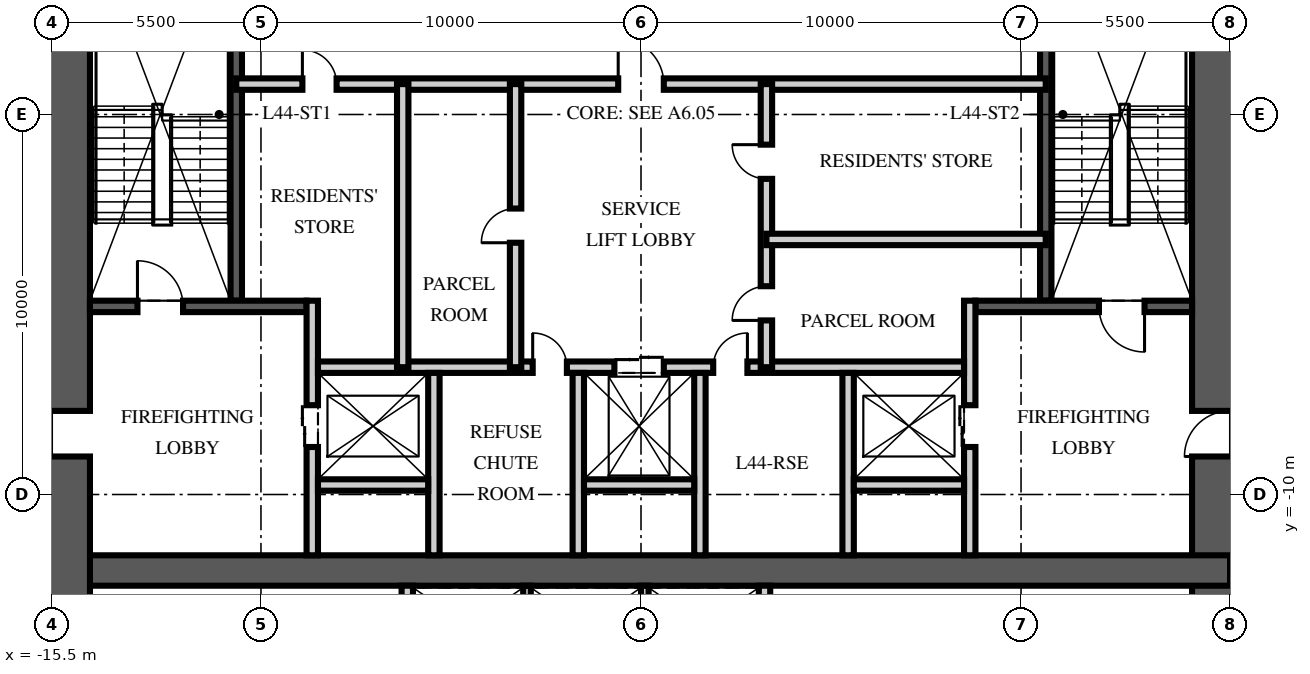
"""IFC4 building model, lengths in metres.
Left out: names, types, materials, properties, quantities, classifications, styles, units other than length and angle.
Written with IfcOpenShell. Run it as: python <this file> out.ifc"""

import sys

from ifc_helpers import new_model, si_unit, direction, frame, frame_2d, origin, place, context, subcontext, project, spatial, rectangle, extrude, element, fill, save


model = new_model("IFC4")
c1 = context("Model", 3, precision=1e-05, world=origin(), true_north=direction((0.0, 1.0)))
c2 = subcontext(c1, "Body", "Model", "MODEL_VIEW")
j1 = project(units=[si_unit("LENGTHUNIT", "METRE"), si_unit("PLANEANGLEUNIT", "RADIAN")], contexts=[c1])
p1 = place(None, origin())
s1 = spatial("IfcSite", under=j1, at=p1, CompositionType="ELEMENT")
p2 = place(p1, origin())
s2 = spatial("IfcBuilding", under=s1, at=p2, CompositionType="ELEMENT")
p3 = place(p2, frame((0.0, 0.0, 174.75)))
s3 = spatial("IfcBuildingStorey", under=s2, at=p3, CompositionType="ELEMENT", Elevation=174.75)
p4 = place(p3, frame((15.5, -15.5, -0.25), z_axis=(0.0, 0.0, 1.0), x_axis=(0.0, 1.0, 0.0)))
e1 = element("IfcWall", 1, at=p4, inside=s3, PredefinedType="SHEAR", context=c2, shape_type="SweptSolid", body=[
    extrude(rectangle(XDim=31.0, YDim=2.0, at=frame_2d((15.5, 0.0))), origin(), (0.0, 0.0, 1.0), 3.75),
])
p5 = place(p4, frame((6.5, 0.0, 0.25)))
e2 = element("IfcOpeningElement", 2, at=p5, cuts=e1, PredefinedType="OPENING", context=c2, shape_type="SweptSolid", body=[
    extrude(rectangle(XDim=1.2, YDim=2.1, at=frame_2d((0.6, 1.05))), frame((0.0, 1.01, 0.0), z_axis=(0.0, -1.0, 0.0), x_axis=(1.0, 0.0, 0.0)), (0.0, 0.0, 1.0), 2.02),
])
p6 = place(p4, frame((23.0, 0.0, 0.25)))
e3 = element("IfcOpeningElement", 3, at=p6, cuts=e1, PredefinedType="OPENING", context=c2, shape_type="SweptSolid", body=[
    extrude(rectangle(XDim=1.8, YDim=2.1, at=frame_2d((0.9, 1.05))), frame((0.0, 1.01, 0.0), z_axis=(0.0, -1.0, 0.0), x_axis=(1.0, 0.0, 0.0)), (0.0, 0.0, 1.0), 2.02),
])
p7 = place(p3, frame((-15.5, -12.0, -0.25), z_axis=(0.0, 0.0, 1.0), x_axis=(1.0, 0.0, 0.0)))
e4 = element("IfcWall", 4, at=p7, inside=s3, PredefinedType="SHEAR", context=c2, shape_type="SweptSolid", body=[
    extrude(rectangle(XDim=31.0, YDim=0.8, at=frame_2d((15.5, 0.0))), origin(), (0.0, 0.0, 1.0), 3.75),
])
p8 = place(p3, frame((-15.5, -15.5, -0.25), z_axis=(0.0, 0.0, 1.0), x_axis=(0.0, 1.0, 0.0)))
e5 = element("IfcWall", 5, at=p8, inside=s3, PredefinedType="SHEAR", context=c2, shape_type="SweptSolid", body=[
    extrude(rectangle(XDim=31.0, YDim=2.0, at=frame_2d((15.5, 0.0))), origin(), (0.0, 0.0, 1.0), 3.75),
])
p9 = place(p8, frame((6.5, 0.0, 0.25)))
e6 = element("IfcOpeningElement", 6, at=p9, cuts=e5, PredefinedType="OPENING", context=c2, shape_type="SweptSolid", body=[
    extrude(rectangle(XDim=1.2, YDim=2.1, at=frame_2d((0.6, 1.05))), frame((0.0, 1.01, 0.0), z_axis=(0.0, -1.0, 0.0), x_axis=(1.0, 0.0, 0.0)), (0.0, 0.0, 1.0), 2.02),
])
p10 = place(p8, frame((23.0, 0.0, 0.25)))
e7 = element("IfcOpeningElement", 7, at=p10, cuts=e5, PredefinedType="OPENING", context=c2, shape_type="SweptSolid", body=[
    extrude(rectangle(XDim=1.8, YDim=2.1, at=frame_2d((0.9, 1.05))), frame((0.0, 1.01, 0.0), z_axis=(0.0, -1.0, 0.0), x_axis=(1.0, 0.0, 0.0)), (0.0, 0.0, 1.0), 2.02),
])
p11 = place(p3, frame((-10.65, -4.9, 0.0), z_axis=(0.0, 0.0, 1.0), x_axis=(0.0, 1.0, 0.0)))
e8 = element("IfcWall", 8, at=p11, inside=s3, PredefinedType="SOLIDWALL", context=c2, shape_type="SweptSolid", body=[
    extrude(rectangle(XDim=10.1, YDim=0.3, at=frame_2d((5.05, 0.0))), origin(), (0.0, 0.0, 1.0), 3.5),
])
p12 = place(p3, frame((-14.5, -5.05, 0.0), z_axis=(0.0, 0.0, 1.0), x_axis=(1.0, 0.0, 0.0)))
e9 = element("IfcWall", 9, at=p12, inside=s3, PredefinedType="SOLIDWALL", context=c2, shape_type="SweptSolid", body=[
    extrude(rectangle(XDim=5.7, YDim=0.3, at=frame_2d((2.85, 0.0))), origin(), (0.0, 0.0, 1.0), 3.5),
])
p13 = place(p12, frame((1.25, 0.0, 0.0)))
e10 = element("IfcOpeningElement", 10, at=p13, cuts=e9, PredefinedType="OPENING", context=c2, shape_type="SweptSolid", body=[
    extrude(rectangle(XDim=1.2, YDim=2.1, at=frame_2d((0.6, 1.05))), frame((0.0, 0.16, 0.0), z_axis=(0.0, -1.0, 0.0), x_axis=(1.0, 0.0, 0.0)), (0.0, 0.0, 1.0), 0.32),
])
p14 = place(p3, frame((-8.65, -11.6, 0.0), z_axis=(0.0, 0.0, 1.0), x_axis=(0.0, 1.0, 0.0)))
e11 = element("IfcWall", 11, at=p14, inside=s3, PredefinedType="PARTITIONING", context=c2, shape_type="SweptSolid", body=[
    extrude(rectangle(XDim=6.7, YDim=0.3, at=frame_2d((3.35, 0.0))), origin(), (0.0, 0.0, 1.0), 3.5),
])
p15 = place(p14, frame((2.85, 0.0, 0.0)))
e12 = element("IfcOpeningElement", 12, at=p15, cuts=e11, PredefinedType="OPENING", context=c2, shape_type="SweptSolid", body=[
    extrude(rectangle(XDim=1.1, YDim=2.1, at=frame_2d((0.55, 1.05))), frame((0.0, 0.16, 0.0), z_axis=(0.0, -1.0, 0.0), x_axis=(1.0, 0.0, 0.0)), (0.0, 0.0, 1.0), 0.32),
])
p16 = place(p3, frame((10.65, -4.9, 0.0), z_axis=(0.0, 0.0, 1.0), x_axis=(0.0, 1.0, 0.0)))
e13 = element("IfcWall", 13, at=p16, inside=s3, PredefinedType="SOLIDWALL", context=c2, shape_type="SweptSolid", body=[
    extrude(rectangle(XDim=10.1, YDim=0.3, at=frame_2d((5.05, 0.0))), origin(), (0.0, 0.0, 1.0), 3.5),
])
p17 = place(p3, frame((14.5, -5.05, 0.0), z_axis=(0.0, 0.0, 1.0), x_axis=(-1.0, 0.0, 0.0)))
e14 = element("IfcWall", 14, at=p17, inside=s3, PredefinedType="SOLIDWALL", context=c2, shape_type="SweptSolid", body=[
    extrude(rectangle(XDim=5.7, YDim=0.3, at=frame_2d((2.85, 0.0))), origin(), (0.0, 0.0, 1.0), 3.5),
])
p18 = place(p17, frame((1.25, 0.0, 0.0)))
e15 = element("IfcOpeningElement", 15, at=p18, cuts=e14, PredefinedType="OPENING", context=c2, shape_type="SweptSolid", body=[
    extrude(rectangle(XDim=1.2, YDim=2.1, at=frame_2d((0.6, 1.05))), frame((0.0, 0.16, 0.0), z_axis=(0.0, -1.0, 0.0), x_axis=(1.0, 0.0, 0.0)), (0.0, 0.0, 1.0), 0.32),
])
p19 = place(p3, frame((8.65, -11.6, 0.0), z_axis=(0.0, 0.0, 1.0), x_axis=(0.0, 1.0, 0.0)))
e16 = element("IfcWall", 16, at=p19, inside=s3, PredefinedType="PARTITIONING", context=c2, shape_type="SweptSolid", body=[
    extrude(rectangle(XDim=6.7, YDim=0.3, at=frame_2d((3.35, 0.0))), origin(), (0.0, 0.0, 1.0), 3.5),
])
p20 = place(p19, frame((2.85, 0.0, 0.0)))
e17 = element("IfcOpeningElement", 17, at=p20, cuts=e16, PredefinedType="OPENING", context=c2, shape_type="SweptSolid", body=[
    extrude(rectangle(XDim=1.1, YDim=2.1, at=frame_2d((0.55, 1.05))), frame((0.0, 0.16, 0.0), z_axis=(0.0, -1.0, 0.0), x_axis=(1.0, 0.0, 0.0)), (0.0, 0.0, 1.0), 0.32),
])
p21 = place(p3, frame((-8.5, -6.65, 0.0), z_axis=(0.0, 0.0, 1.0), x_axis=(1.0, 0.0, 0.0)))
e18 = element("IfcWall", 18, at=p21, inside=s3, PredefinedType="PARTITIONING", context=c2, shape_type="SweptSolid", body=[
    extrude(rectangle(XDim=17.0, YDim=0.3, at=frame_2d((8.5, 0.0))), origin(), (0.0, 0.0, 1.0), 3.5),
])
p22 = place(p21, frame((7.8, 0.0, 0.0)))
e19 = element("IfcOpeningElement", 19, at=p22, cuts=e18, PredefinedType="OPENING", context=c2, shape_type="SweptSolid", body=[
    extrude(rectangle(XDim=1.3, YDim=2.4, at=frame_2d((0.65, 1.2))), frame((0.0, 0.16, 0.0), z_axis=(0.0, -1.0, 0.0), x_axis=(1.0, 0.0, 0.0)), (0.0, 0.0, 1.0), 0.32),
])
p23 = place(p21, frame((5.65, 0.0, 0.0)))
e20 = element("IfcOpeningElement", 20, at=p23, cuts=e18, PredefinedType="OPENING", context=c2, shape_type="SweptSolid", body=[
    extrude(rectangle(XDim=0.9, YDim=2.1, at=frame_2d((0.45, 1.05))), frame((0.0, 0.16, 0.0), z_axis=(0.0, -1.0, 0.0), x_axis=(1.0, 0.0, 0.0)), (0.0, 0.0, 1.0), 0.32),
])
p24 = place(p21, frame((10.4, 0.0, 0.0)))
e21 = element("IfcOpeningElement", 21, at=p24, cuts=e18, PredefinedType="OPENING", context=c2, shape_type="SweptSolid", body=[
    extrude(rectangle(XDim=0.9, YDim=2.1, at=frame_2d((0.45, 1.05))), frame((0.0, 0.16, 0.0), z_axis=(0.0, -1.0, 0.0), x_axis=(1.0, 0.0, 0.0)), (0.0, 0.0, 1.0), 0.32),
])
for number, where, z_axis, x_axis in (
    (22, (-5.45, -11.6, 0.0), (0.0, 0.0, 1.0), (0.0, 1.0, 0.0)),
    (23, (-1.65, -11.6, 0.0), (0.0, 0.0, 1.0), (0.0, 1.0, 0.0)),
    (24, (1.55, -11.6, 0.0), (0.0, 0.0, 1.0), (0.0, 1.0, 0.0)),
    (25, (5.45, -11.6, 0.0), (0.0, 0.0, 1.0), (0.0, 1.0, 0.0)),
):
    element("IfcWall", number, at=place(p3, frame(where, z_axis=z_axis, x_axis=x_axis)), inside=s3, PredefinedType="PARTITIONING", context=c2, shape_type="SweptSolid", body=[
        extrude(rectangle(XDim=4.8, YDim=0.3, at=frame_2d((2.4, 0.0))), origin(), (0.0, 0.0, 1.0), 3.5),
    ])
for number, where, z_axis, x_axis in (
    (26, (-8.5, -9.75, 0.0), (0.0, 0.0, 1.0), (1.0, 0.0, 0.0)),
    (27, (-1.5, -9.75, 0.0), (0.0, 0.0, 1.0), (1.0, 0.0, 0.0)),
    (28, (5.6, -9.75, 0.0), (0.0, 0.0, 1.0), (1.0, 0.0, 0.0)),
):
    element("IfcWall", number, at=place(p3, frame(where, z_axis=z_axis, x_axis=x_axis)), inside=s3, PredefinedType="PARTITIONING", context=c2, shape_type="SweptSolid", body=[
        extrude(rectangle(XDim=2.9, YDim=0.3, at=frame_2d((1.45, 0.0))), origin(), (0.0, 0.0, 1.0), 3.5),
    ])
for number, where, z_axis, x_axis in (
    (29, (-6.15, -14.5, 0.0), (0.0, 0.0, 1.0), (0.0, 1.0, 0.0)),
    (30, (3.25, -14.5, 0.0), (0.0, 0.0, 1.0), (0.0, 1.0, 0.0)),
):
    element("IfcWall", number, at=place(p3, frame(where, z_axis=z_axis, x_axis=x_axis)), inside=s3, PredefinedType="PARTITIONING", context=c2, shape_type="SweptSolid", body=[
        extrude(rectangle(XDim=2.1, YDim=0.3, at=frame_2d((1.05, 0.0))), origin(), (0.0, 0.0, 1.0), 3.5),
    ])
for number, where, z_axis, x_axis in (
    (31, (-3.0, -14.5, 0.0), (0.0, 0.0, 1.0), (0.0, 1.0, 0.0)),
    (32, (0.1, -14.5, 0.0), (0.0, 0.0, 1.0), (0.0, 1.0, 0.0)),
):
    element("IfcWall", number, at=place(p3, frame(where, z_axis=z_axis, x_axis=x_axis)), inside=s3, PredefinedType="PARTITIONING", context=c2, shape_type="SweptSolid", body=[
        extrude(rectangle(XDim=2.1, YDim=0.2, at=frame_2d((1.05, 0.0))), origin(), (0.0, 0.0, 1.0), 3.5),
    ])
p25 = place(p3, frame((-10.65, 0.8, 0.0), z_axis=(0.0, 0.0, 1.0), x_axis=(1.0, 0.0, 0.0)))
e33 = element("IfcWall", 33, at=p25, inside=s3, PredefinedType="PARTITIONING", context=c2, shape_type="SweptSolid", body=[
    extrude(rectangle(XDim=21.3, YDim=0.3, at=frame_2d((10.65, 0.0))), origin(), (0.0, 0.0, 1.0), 3.5),
])
p26 = place(p25, frame((10.05, 0.0, 0.0)))
e34 = element("IfcOpeningElement", 34, at=p26, cuts=e33, PredefinedType="OPENING", context=c2, shape_type="SweptSolid", body=[
    extrude(rectangle(XDim=1.2, YDim=2.1, at=frame_2d((0.6, 1.05))), frame((0.0, 0.16, 0.0), z_axis=(0.0, -1.0, 0.0), x_axis=(1.0, 0.0, 0.0)), (0.0, 0.0, 1.0), 0.32),
])
p27 = place(p25, frame((1.74, 0.0, 0.0)))
e35 = element("IfcOpeningElement", 35, at=p27, cuts=e33, PredefinedType="OPENING", context=c2, shape_type="SweptSolid", body=[
    extrude(rectangle(XDim=0.9, YDim=2.1, at=frame_2d((0.45, 1.05))), frame((0.0, 0.16, 0.0), z_axis=(0.0, -1.0, 0.0), x_axis=(1.0, 0.0, 0.0)), (0.0, 0.0, 1.0), 0.32),
])
p28 = place(p3, frame((-3.3, -6.65, 0.0), z_axis=(0.0, 0.0, 1.0), x_axis=(0.0, 1.0, 0.0)))
e36 = element("IfcWall", 36, at=p28, inside=s3, PredefinedType="PARTITIONING", context=c2, shape_type="SweptSolid", body=[
    extrude(rectangle(XDim=7.45, YDim=0.3, at=frame_2d((3.725, 0.0))), origin(), (0.0, 0.0, 1.0), 3.5),
])
p29 = place(p28, frame((3.275, 0.0, 0.0)))
e37 = element("IfcOpeningElement", 37, at=p29, cuts=e36, PredefinedType="OPENING", context=c2, shape_type="SweptSolid", body=[
    extrude(rectangle(XDim=0.9, YDim=2.1, at=frame_2d((0.45, 1.05))), frame((0.0, 0.16, 0.0), z_axis=(0.0, -1.0, 0.0), x_axis=(1.0, 0.0, 0.0)), (0.0, 0.0, 1.0), 0.32),
])
p30 = place(p3, frame((3.3, -6.65, 0.0), z_axis=(0.0, 0.0, 1.0), x_axis=(0.0, 1.0, 0.0)))
e38 = element("IfcWall", 38, at=p30, inside=s3, PredefinedType="PARTITIONING", context=c2, shape_type="SweptSolid", body=[
    extrude(rectangle(XDim=7.45, YDim=0.3, at=frame_2d((3.725, 0.0))), origin(), (0.0, 0.0, 1.0), 3.5),
])
p31 = place(p30, frame((1.231, 0.0, 0.0)))
e39 = element("IfcOpeningElement", 39, at=p31, cuts=e38, PredefinedType="OPENING", context=c2, shape_type="SweptSolid", body=[
    extrude(rectangle(XDim=0.9, YDim=2.1, at=frame_2d((0.45, 1.05))), frame((0.0, 0.16, 0.0), z_axis=(0.0, -1.0, 0.0), x_axis=(1.0, 0.0, 0.0)), (0.0, 0.0, 1.0), 0.32),
])
p32 = place(p30, frame((4.956, 0.0, 0.0)))
e40 = element("IfcOpeningElement", 40, at=p32, cuts=e38, PredefinedType="OPENING", context=c2, shape_type="SweptSolid", body=[
    extrude(rectangle(XDim=0.9, YDim=2.1, at=frame_2d((0.45, 1.05))), frame((0.0, 0.16, 0.0), z_axis=(0.0, -1.0, 0.0), x_axis=(1.0, 0.0, 0.0)), (0.0, 0.0, 1.0), 0.32),
])
p33 = place(p3, frame((-6.27, -6.65, 0.0), z_axis=(0.0, 0.0, 1.0), x_axis=(0.0, 1.0, 0.0)))
e41 = element("IfcWall", 41, at=p33, inside=s3, PredefinedType="PARTITIONING", context=c2, shape_type="SweptSolid", body=[
    extrude(rectangle(XDim=7.45, YDim=0.3, at=frame_2d((3.725, 0.0))), origin(), (0.0, 0.0, 1.0), 3.5),
])
p34 = place(p3, frame((10.65, -3.288, 0.0), z_axis=(0.0, 0.0, 1.0), x_axis=(-1.0, 0.0, 0.0)))
e42 = element("IfcWall", 42, at=p34, inside=s3, PredefinedType="PARTITIONING", context=c2, shape_type="SweptSolid", body=[
    extrude(rectangle(XDim=7.35, YDim=0.3, at=frame_2d((3.675, 0.0))), origin(), (0.0, 0.0, 1.0), 3.5),
])
p35 = place(p13, origin())
e43 = element("IfcDoor", 43, at=p35, inside=s3, OperationType="SINGLE_SWING_LEFT", PredefinedType="DOOR", context=c2, shape_type="SweptSolid", body=[
    extrude(rectangle(XDim=1.2, YDim=2.1, at=frame_2d((0.6, 1.05))), frame((0.0, 0.025, 0.0), z_axis=(0.0, -1.0, 0.0), x_axis=(1.0, 0.0, 0.0)), (0.0, 0.0, 1.0), 0.05),
])
fill(e10, e43)
p36 = place(p9, origin())
e44 = element("IfcDoor", 44, at=p36, inside=s3, OperationType="SINGLE_SWING_LEFT", PredefinedType="DOOR", context=c2, shape_type="SweptSolid", body=[
    extrude(rectangle(XDim=1.2, YDim=2.1, at=frame_2d((0.6, 1.05))), frame((0.0, 0.025, 0.0), z_axis=(0.0, -1.0, 0.0), x_axis=(1.0, 0.0, 0.0)), (0.0, 0.0, 1.0), 0.05),
])
fill(e6, e44)
p37 = place(p18, origin())
e45 = element("IfcDoor", 45, at=p37, inside=s3, OperationType="SINGLE_SWING_LEFT", PredefinedType="DOOR", context=c2, shape_type="SweptSolid", body=[
    extrude(rectangle(XDim=1.2, YDim=2.1, at=frame_2d((0.6, 1.05))), frame((0.0, 0.025, 0.0), z_axis=(0.0, -1.0, 0.0), x_axis=(1.0, 0.0, 0.0)), (0.0, 0.0, 1.0), 0.05),
])
fill(e15, e45)
p38 = place(p5, origin())
e46 = element("IfcDoor", 46, at=p38, inside=s3, OperationType="SINGLE_SWING_LEFT", PredefinedType="DOOR", context=c2, shape_type="SweptSolid", body=[
    extrude(rectangle(XDim=1.2, YDim=2.1, at=frame_2d((0.6, 1.05))), frame((0.0, 0.025, 0.0), z_axis=(0.0, -1.0, 0.0), x_axis=(1.0, 0.0, 0.0)), (0.0, 0.0, 1.0), 0.05),
])
fill(e2, e46)
p39 = place(p15, origin())
e47 = element("IfcDoor", 47, at=p39, inside=s3, OperationType="DOUBLE_DOOR_SLIDING", PredefinedType="DOOR", context=c2, shape_type="SweptSolid", body=[
    extrude(rectangle(XDim=1.1, YDim=2.1, at=frame_2d((0.55, 1.05))), frame((0.0, 0.025, 0.0), z_axis=(0.0, -1.0, 0.0), x_axis=(1.0, 0.0, 0.0)), (0.0, 0.0, 1.0), 0.05),
])
fill(e12, e47)
p40 = place(p20, origin())
e48 = element("IfcDoor", 48, at=p40, inside=s3, OperationType="DOUBLE_DOOR_SLIDING", PredefinedType="DOOR", context=c2, shape_type="SweptSolid", body=[
    extrude(rectangle(XDim=1.1, YDim=2.1, at=frame_2d((0.55, 1.05))), frame((0.0, 0.025, 0.0), z_axis=(0.0, -1.0, 0.0), x_axis=(1.0, 0.0, 0.0)), (0.0, 0.0, 1.0), 0.05),
])
fill(e17, e48)
p41 = place(p22, origin())
e49 = element("IfcDoor", 49, at=p41, inside=s3, OperationType="DOUBLE_DOOR_SLIDING", PredefinedType="DOOR", context=c2, shape_type="SweptSolid", body=[
    extrude(rectangle(XDim=1.3, YDim=2.4, at=frame_2d((0.65, 1.2))), frame((0.0, 0.025, 0.0), z_axis=(0.0, -1.0, 0.0), x_axis=(1.0, 0.0, 0.0)), (0.0, 0.0, 1.0), 0.05),
])
fill(e19, e49)
p42 = place(p26, origin())
e50 = element("IfcDoor", 50, at=p42, inside=s3, OperationType="SINGLE_SWING_LEFT", PredefinedType="DOOR", context=c2, shape_type="SweptSolid", body=[
    extrude(rectangle(XDim=1.2, YDim=2.1, at=frame_2d((0.6, 1.05))), frame((0.0, 0.025, 0.0), z_axis=(0.0, -1.0, 0.0), x_axis=(1.0, 0.0, 0.0)), (0.0, 0.0, 1.0), 0.05),
])
fill(e34, e50)
p43 = place(p23, origin())
e51 = element("IfcDoor", 51, at=p43, inside=s3, OperationType="SINGLE_SWING_LEFT", PredefinedType="DOOR", context=c2, shape_type="SweptSolid", body=[
    extrude(rectangle(XDim=0.9, YDim=2.1, at=frame_2d((0.45, 1.05))), frame((0.0, 0.025, 0.0), z_axis=(0.0, -1.0, 0.0), x_axis=(1.0, 0.0, 0.0)), (0.0, 0.0, 1.0), 0.05),
])
fill(e20, e51)
p44 = place(p24, origin())
e52 = element("IfcDoor", 52, at=p44, inside=s3, OperationType="SINGLE_SWING_RIGHT", PredefinedType="DOOR", context=c2, shape_type="SweptSolid", body=[
    extrude(rectangle(XDim=0.9, YDim=2.1, at=frame_2d((0.45, 1.05))), frame((0.0, 0.025, 0.0), z_axis=(0.0, -1.0, 0.0), x_axis=(1.0, 0.0, 0.0)), (0.0, 0.0, 1.0), 0.05),
])
fill(e21, e52)
p45 = place(p29, origin())
e53 = element("IfcDoor", 53, at=p45, inside=s3, OperationType="SINGLE_SWING_LEFT", PredefinedType="DOOR", context=c2, shape_type="SweptSolid", body=[
    extrude(rectangle(XDim=0.9, YDim=2.1, at=frame_2d((0.45, 1.05))), frame((0.0, 0.025, 0.0), z_axis=(0.0, -1.0, 0.0), x_axis=(1.0, 0.0, 0.0)), (0.0, 0.0, 1.0), 0.05),
])
fill(e37, e53)
p46 = place(p27, origin())
e54 = element("IfcDoor", 54, at=p46, inside=s3, OperationType="SINGLE_SWING_LEFT", PredefinedType="DOOR", context=c2, shape_type="SweptSolid", body=[
    extrude(rectangle(XDim=0.9, YDim=2.1, at=frame_2d((0.45, 1.05))), frame((0.0, 0.025, 0.0), z_axis=(0.0, -1.0, 0.0), x_axis=(1.0, 0.0, 0.0)), (0.0, 0.0, 1.0), 0.05),
])
fill(e35, e54)
p47 = place(p31, origin())
e55 = element("IfcDoor", 55, at=p47, inside=s3, OperationType="SINGLE_SWING_LEFT", PredefinedType="DOOR", context=c2, shape_type="SweptSolid", body=[
    extrude(rectangle(XDim=0.9, YDim=2.1, at=frame_2d((0.45, 1.05))), frame((0.0, 0.025, 0.0), z_axis=(0.0, -1.0, 0.0), x_axis=(1.0, 0.0, 0.0)), (0.0, 0.0, 1.0), 0.05),
])
fill(e39, e55)
p48 = place(p32, origin())
e56 = element("IfcDoor", 56, at=p48, inside=s3, OperationType="SINGLE_SWING_RIGHT", PredefinedType="DOOR", context=c2, shape_type="SweptSolid", body=[
    extrude(rectangle(XDim=0.9, YDim=2.1, at=frame_2d((0.45, 1.05))), frame((0.0, 0.025, 0.0), z_axis=(0.0, -1.0, 0.0), x_axis=(1.0, 0.0, 0.0)), (0.0, 0.0, 1.0), 0.05),
])
fill(e40, e56)
save(model, sys.argv[1])
